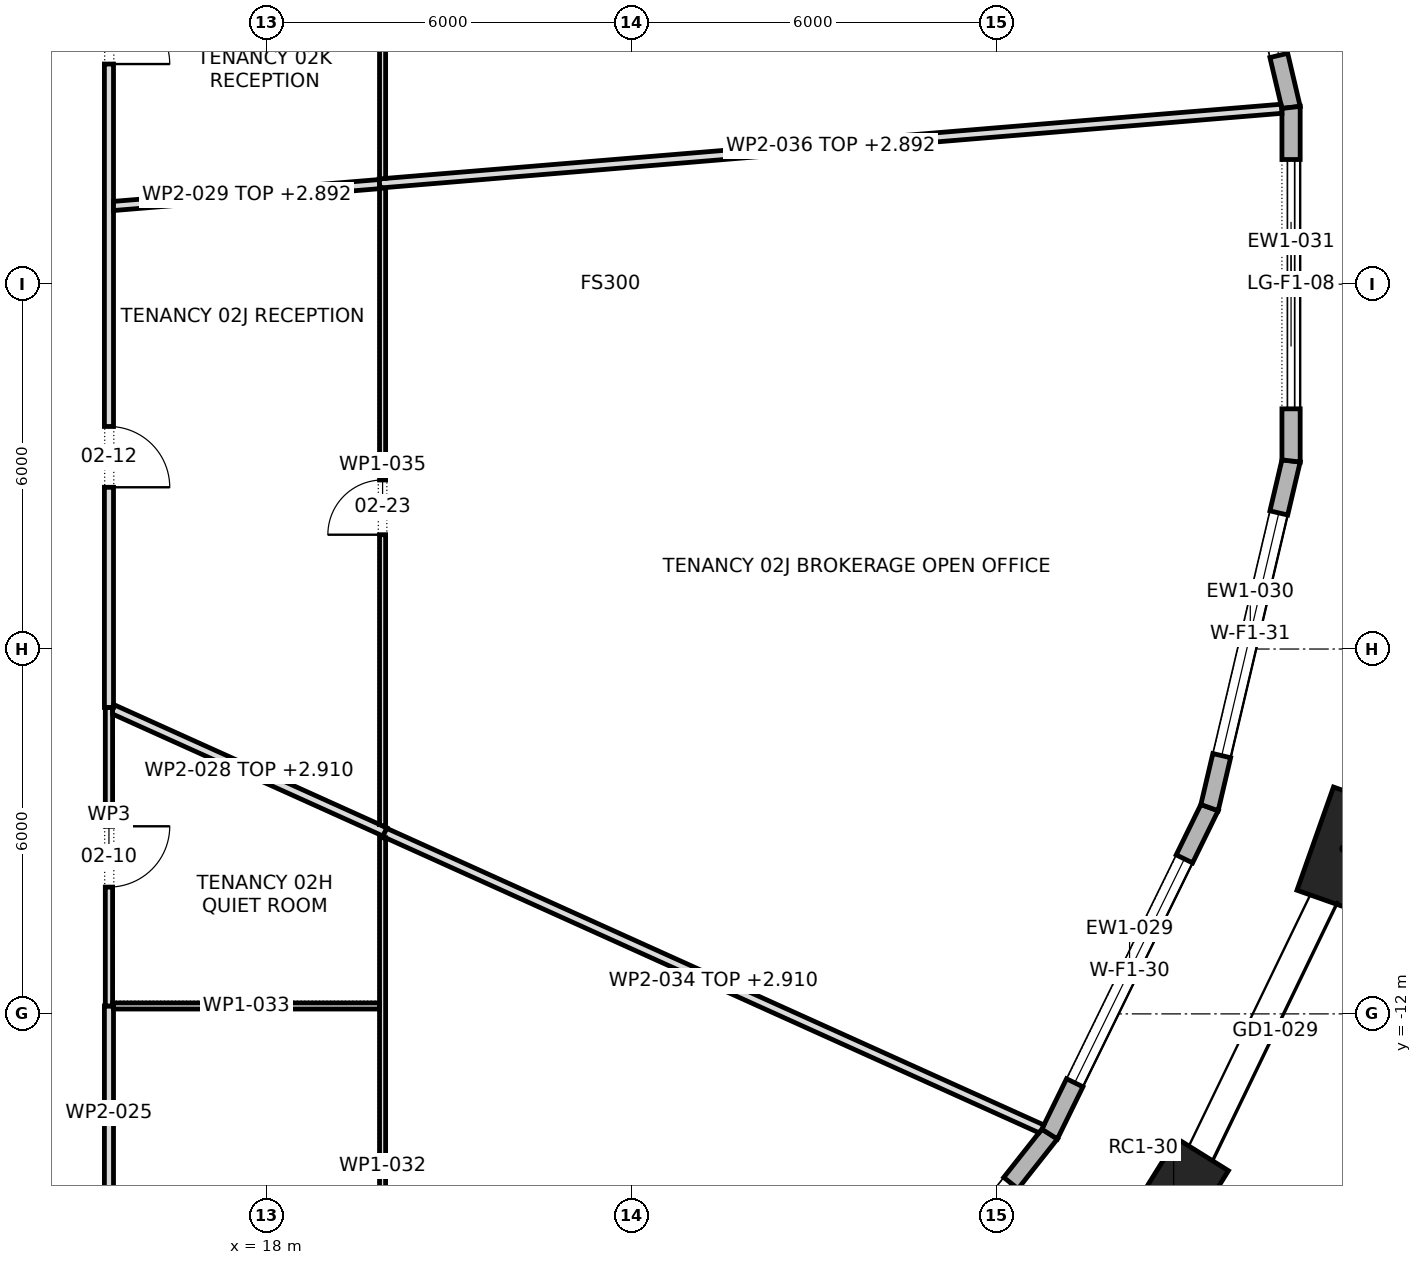
"""IFC4 building model, lengths in metres.
Left out: names, types, materials, properties, quantities, classifications, styles, units other than length and angle.
Written with IfcOpenShell. Run it as: python <this file> out.ifc"""

import sys

from ifc_helpers import new_model, si_unit, direction, frame, frame_2d, origin, origin_2d, place, context, subcontext, project, spatial, polyline, rectangle, outline, extrude, element, fill, save


model = new_model("IFC4")
c1 = context("Model", 3, precision=1e-05, world=origin(), true_north=direction((0.0, 1.0)))
c2 = subcontext(c1, "Body", "Model", "MODEL_VIEW")
j1 = project(units=[si_unit("LENGTHUNIT", "METRE"), si_unit("PLANEANGLEUNIT", "RADIAN")], contexts=[c1])
p1 = place(None, origin())
s1 = spatial("IfcSite", under=j1, at=p1, CompositionType="ELEMENT")
p2 = place(p1, origin())
s2 = spatial("IfcBuilding", under=s1, at=p2, CompositionType="ELEMENT")
p3 = place(p2, frame((0.0, 0.0, 44.5)))
s3 = spatial("IfcBuildingStorey", under=s2, at=p3, CompositionType="ELEMENT", Elevation=44.5)
for number, where, z_axis, x_axis in (
    (1, (32.91, -15.078, 0.0), (0.0, 0.0, 1.0), (0.529, 0.849, 0.0)),
    (2, (35.709, -9.285, 0.0), (0.0, 0.0, 1.0), (0.334, 0.943, 0.0)),
):
    element("IfcColumn", number, at=place(p3, frame(where, z_axis=z_axis, x_axis=x_axis)), inside=s3, PredefinedType="COLUMN", context=c2, shape_type="SweptSolid", body=[
        extrude(rectangle(XDim=1.8, YDim=1.0, at=origin_2d()), origin(), (0.0, 0.0, 1.0), 4.2),
    ])
p4 = place(p3, frame((34.84, 2.907, 0.0), z_axis=(0.0, 0.0, 1.0), x_axis=(-0.228976600496, 0.97343192696, 0.0)))
e3 = element("IfcWall", 3, at=p4, inside=s3, PredefinedType="STANDARD", context=c2, shape_type="SweptSolid", body=[
    extrude(outline(polyline([(-0.017, -0.15), (5.874, -0.15), (5.84, 0.15), (0.017, 0.15), (-0.017, -0.15)])), origin(), (0.0, 0.0, 1.0), 3.9),
])
p5 = place(p4, frame((0.878, 0.0, 0.6)))
e4 = element("IfcOpeningElement", 4, at=p5, cuts=e3, PredefinedType="OPENING", context=c2, shape_type="SweptSolid", body=[
    extrude(rectangle(XDim=4.1, YDim=2.85, at=frame_2d((2.05, 1.425))), frame((0.0, 0.162, 0.0), z_axis=(0.0, -1.0, 0.0), x_axis=(1.0, 0.0, 0.0)), (0.0, 0.0, 1.0), 0.324),
])
p6 = place(p3, frame((27.054, -18.806, 0.0), z_axis=(0.0, 0.0, 1.0), x_axis=(0.61992334328, 0.784662378642, 0.0)))
e5 = element("IfcWall", 5, at=p6, inside=s3, PredefinedType="STANDARD", context=c2, shape_type="SweptSolid", body=[
    extrude(outline(polyline([(-0.015, -0.15), (6.171, -0.15), (6.139, 0.15), (0.015, 0.15), (-0.015, -0.15)])), origin(), (0.0, 0.0, 1.0), 3.9),
])
p7 = place(p6, frame((1.027, 0.0, 0.6)))
e6 = element("IfcOpeningElement", 6, at=p7, cuts=e5, PredefinedType="OPENING", context=c2, shape_type="SweptSolid", body=[
    extrude(rectangle(XDim=4.1, YDim=2.85, at=frame_2d((2.05, 1.425))), frame((0.0, 0.162, 0.0), z_axis=(0.0, -1.0, 0.0), x_axis=(1.0, 0.0, 0.0)), (0.0, 0.0, 1.0), 0.324),
])
p8 = place(p3, frame((30.869, -13.976, 0.0), z_axis=(0.0, 0.0, 1.0), x_axis=(0.439896354052, 0.898048549741, 0.0)))
e7 = element("IfcWall", 7, at=p8, inside=s3, PredefinedType="STANDARD", context=c2, shape_type="SweptSolid", body=[
    extrude(outline(polyline([(-0.016, -0.15), (5.995, -0.15), (5.961, 0.15), (0.016, 0.15), (-0.016, -0.15)])), origin(), (0.0, 0.0, 1.0), 3.9),
])
p9 = place(p8, frame((0.939, 0.0, 0.6)))
e8 = element("IfcOpeningElement", 8, at=p9, cuts=e7, PredefinedType="OPENING", context=c2, shape_type="SweptSolid", body=[
    extrude(rectangle(XDim=4.1, YDim=2.85, at=frame_2d((2.05, 1.425))), frame((0.0, 0.162, 0.0), z_axis=(0.0, -1.0, 0.0), x_axis=(1.0, 0.0, 0.0)), (0.0, 0.0, 1.0), 0.324),
])
p10 = place(p3, frame((33.499, -8.608, 0.0), z_axis=(0.0, 0.0, 1.0), x_axis=(0.228976600496, 0.97343192696, 0.0)))
e9 = element("IfcWall", 9, at=p10, inside=s3, PredefinedType="STANDARD", context=c2, shape_type="SweptSolid", body=[
    extrude(outline(polyline([(-0.017, -0.15), (5.874, -0.15), (5.839, 0.15), (0.017, 0.15), (-0.017, -0.15)])), origin(), (0.0, 0.0, 1.0), 3.9),
])
p11 = place(p10, frame((0.878, 0.0, 0.6)))
e10 = element("IfcOpeningElement", 10, at=p11, cuts=e9, PredefinedType="OPENING", context=c2, shape_type="SweptSolid", body=[
    extrude(rectangle(XDim=4.1, YDim=2.85, at=frame_2d((2.05, 1.425))), frame((0.0, 0.162, 0.0), z_axis=(0.0, -1.0, 0.0), x_axis=(1.0, 0.0, 0.0)), (0.0, 0.0, 1.0), 0.324),
])
p12 = place(p3, frame((34.84, -2.907, 0.0), z_axis=(0.0, 0.0, 1.0), x_axis=(0.0, 1.0, 0.0)))
e11 = element("IfcWall", 11, at=p12, inside=s3, PredefinedType="STANDARD", context=c2, shape_type="SweptSolid", body=[
    extrude(outline(polyline([(-0.017, -0.15), (5.831, -0.15), (5.796, 0.15), (0.017, 0.15), (-0.017, -0.15)])), origin(), (0.0, 0.0, 1.0), 3.9),
])
p13 = place(p12, frame((0.857, 0.0, 0.0)))
e12 = element("IfcOpeningElement", 12, at=p13, cuts=e11, PredefinedType="OPENING", context=c2, shape_type="SweptSolid", body=[
    extrude(rectangle(XDim=4.1, YDim=3.45, at=frame_2d((2.05, 1.725))), frame((0.0, 0.162, 0.0), z_axis=(0.0, -1.0, 0.0), x_axis=(1.0, 0.0, 0.0)), (0.0, 0.0, 1.0), 0.324),
])
p14 = place(p3, frame((15.4, -11.87, 0.0), z_axis=(0.0, 0.0, 1.0), x_axis=(0.0, -1.0, 0.0)))
e13 = element("IfcWall", 13, at=p14, inside=s3, PredefinedType="PARTITIONING", context=c2, shape_type="SweptSolid", body=[
    extrude(outline(polyline([(0.0, -0.075), (1.728, -0.075), (3.455, -0.075), (3.605, 0.075), (1.802, 0.075), (0.0, 0.075), (0.0, -0.075)])), origin(), (0.0, 0.0, 1.0), 3.9),
])
p15 = place(p3, frame((15.4, -6.96, 0.0), z_axis=(0.0, 0.0, 1.0), x_axis=(0.0, -1.0, 0.0)))
e14 = element("IfcWall", 14, at=p15, inside=s3, PredefinedType="PARTITIONING", context=c2, shape_type="SweptSolid", body=[
    extrude(rectangle(XDim=4.91, YDim=0.12, at=frame_2d((2.455, 0.0))), origin(), (0.0, 0.0, 1.0), 3.9),
])
p16 = place(p15, frame((1.955, 0.0, 0.0)))
e15 = element("IfcOpeningElement", 15, at=p16, cuts=e14, PredefinedType="OPENING", context=c2, shape_type="SweptSolid", body=[
    extrude(rectangle(XDim=1.0, YDim=2.1, at=frame_2d((0.5, 1.05))), frame((0.0, 0.072, 0.0), z_axis=(0.0, -1.0, 0.0), x_axis=(1.0, 0.0, 0.0)), (0.0, 0.0, 1.0), 0.144),
])
p17 = place(p3, frame((15.4, -6.96, 0.0), z_axis=(0.0, 0.0, 1.0), x_axis=(0.0, 1.0, 0.0)))
e16 = element("IfcWall", 16, at=p17, inside=s3, PredefinedType="PARTITIONING", context=c2, shape_type="SweptSolid", body=[
    extrude(outline(polyline([(0.0, -0.075), (1.87, -0.075), (3.739, -0.075), (5.609, -0.075), (7.478, -0.075), (9.348, -0.075), (11.217, -0.075), (13.087, -0.075), (14.957, -0.075), (16.826, -0.075), (18.696, -0.075), (20.565, -0.075), (22.435, -0.075), (22.285, 0.075), (20.428, 0.075), (18.571, 0.075), (16.714, 0.075), (14.857, 0.075), (13.0, 0.075), (11.143, 0.075), (9.285, 0.075), (7.428, 0.075), (5.571, 0.075), (3.714, 0.075), (1.857, 0.075), (0.0, 0.075), (0.0, -0.075)])), origin(), (0.0, 0.0, 1.0), 3.9),
])
p18 = place(p17, frame((3.62, 0.0, 0.0)))
e17 = element("IfcOpeningElement", 17, at=p18, cuts=e16, PredefinedType="OPENING", context=c2, shape_type="SweptSolid", body=[
    extrude(rectangle(XDim=1.0, YDim=2.1, at=frame_2d((0.5, 1.05))), frame((0.0, 0.087, 0.0), z_axis=(0.0, -1.0, 0.0), x_axis=(1.0, 0.0, 0.0)), (0.0, 0.0, 1.0), 0.174),
])
p19 = place(p17, frame((10.58, 0.0, 0.0)))
e18 = element("IfcOpeningElement", 18, at=p19, cuts=e16, PredefinedType="OPENING", context=c2, shape_type="SweptSolid", body=[
    extrude(rectangle(XDim=1.0, YDim=2.1, at=frame_2d((0.5, 1.05))), frame((0.0, 0.087, 0.0), z_axis=(0.0, -1.0, 0.0), x_axis=(1.0, 0.0, 0.0)), (0.0, 0.0, 1.0), 0.174),
])
p20 = place(p17, frame((16.335, 0.0, 0.0)))
e19 = element("IfcOpeningElement", 19, at=p20, cuts=e16, PredefinedType="OPENING", context=c2, shape_type="SweptSolid", body=[
    extrude(rectangle(XDim=1.0, YDim=2.1, at=frame_2d((0.5, 1.05))), frame((0.0, 0.087, 0.0), z_axis=(0.0, -1.0, 0.0), x_axis=(1.0, 0.0, 0.0)), (0.0, 0.0, 1.0), 0.174),
])
p21 = place(p3, frame((15.444, -6.98, 0.0), z_axis=(0.0, 0.0, 1.0), x_axis=(0.911554382715, -0.411179531778, 0.0)))
e20 = element("IfcWall", 20, at=p21, inside=s3, PredefinedType="PARTITIONING", context=c2, shape_type="SweptSolid", body=[
    extrude(outline(polyline([(0.051, -0.075), (1.678, -0.075), (3.305, -0.075), (4.932, -0.075), (4.932, -0.054), (4.932, 0.075), (4.805, 0.075), (4.801, 0.073), (4.8, 0.075), (3.2, 0.075), (1.6, 0.075), (0.0, 0.075), (0.02, 0.031), (0.006, 0.025), (0.051, -0.075)])), origin(), (0.0, 0.0, 1.0), 2.91),
])
p22 = place(p3, frame((15.469, 1.286, 0.0), z_axis=(0.0, 0.0, 1.0), x_axis=(0.996634800256, 0.081969963512, 0.0)))
e21 = element("IfcWall", 21, at=p22, inside=s3, PredefinedType="PARTITIONING", context=c2, shape_type="SweptSolid", body=[
    extrude(outline(polyline([(0.0, -0.075), (1.463, -0.075), (2.926, -0.075), (4.389, -0.075), (4.389, -0.075), (4.393, -0.075), (4.396, -0.075), (4.396, 0.075), (2.935, 0.075), (1.473, 0.075), (0.012, 0.075), (0.0, -0.07), (0.0, -0.075)])), origin(), (0.0, 0.0, 1.0), 2.892),
])
p23 = place(p3, frame((19.9, -19.95, 0.0), z_axis=(0.0, 0.0, 1.0), x_axis=(0.0, 1.0, 0.0)))
e22 = element("IfcWall", 22, at=p23, inside=s3, PredefinedType="PARTITIONING", context=c2, shape_type="SweptSolid", body=[
    extrude(outline(polyline([(10.846, 0.05), (9.055, 0.05), (7.264, 0.05), (5.473, 0.05), (3.682, 0.05), (1.891, 0.05), (0.1, 0.05), (0.0, -0.05), (1.808, -0.05), (3.615, -0.05), (5.423, -0.05), (7.231, -0.05), (9.039, -0.05), (10.846, -0.05), (10.846, 0.05)])), origin(), (0.0, 0.0, 1.0), 3.9),
])
p24 = place(p23, frame((3.615, 0.0, 0.0)))
e23 = element("IfcOpeningElement", 23, at=p24, cuts=e22, PredefinedType="OPENING", context=c2, shape_type="SweptSolid", body=[
    extrude(rectangle(XDim=0.9, YDim=2.1, at=frame_2d((0.45, 1.05))), frame((0.0, 0.062, 0.0), z_axis=(0.0, -1.0, 0.0), x_axis=(1.0, 0.0, 0.0)), (0.0, 0.0, 1.0), 0.124),
])
p25 = place(p3, frame((19.85, -11.87, 0.0), z_axis=(0.0, 0.0, 1.0), x_axis=(-1.0, 0.0, 0.0)))
e24 = element("IfcWall", 24, at=p25, inside=s3, PredefinedType="PARTITIONING", context=c2, shape_type="SweptSolid", body=[
    extrude(outline(polyline([(4.39, -0.05), (4.39, 0.0), (4.375, 0.0), (4.375, 0.05), (2.917, 0.05), (1.458, 0.05), (0.0, 0.05), (0.0, -0.05), (1.463, -0.05), (2.927, -0.05), (4.39, -0.05)])), origin(), (0.0, 0.0, 1.0), 3.9),
])
p26 = place(p3, frame((19.937, -9.017, 0.0), z_axis=(0.0, 0.0, 1.0), x_axis=(0.911435859514, -0.411442187909, 0.0)))
e25 = element("IfcWall", 25, at=p26, inside=s3, PredefinedType="PARTITIONING", context=c2, shape_type="SweptSolid", body=[
    extrude(outline(polyline([(0.0, -0.075), (0.045, -0.075), (0.048, -0.074), (0.049, -0.075), (2.013, -0.075), (3.978, -0.075), (5.943, -0.075), (7.908, -0.075), (9.873, -0.075), (11.838, -0.075), (11.856, -0.001), (11.858, 0.069), (11.858, 0.075), (9.882, 0.075), (7.906, 0.075), (5.929, 0.075), (3.953, 0.075), (1.976, 0.075), (0.0, 0.075), (0.0, -0.075)])), origin(), (0.0, 0.0, 1.0), 2.91),
])
p27 = place(p3, frame((19.9, 1.588, 0.0), z_axis=(0.0, 0.0, 1.0), x_axis=(0.0, -1.0, 0.0)))
e26 = element("IfcWall", 26, at=p27, inside=s3, PredefinedType="PARTITIONING", context=c2, shape_type="SweptSolid", body=[
    extrude(outline(polyline([(0.018, -0.05), (1.76, -0.05), (3.503, -0.05), (5.246, -0.05), (6.988, -0.05), (8.731, -0.05), (10.473, -0.05), (10.518, 0.049), (10.518, 0.05), (8.765, 0.05), (7.012, 0.05), (5.259, 0.05), (3.506, 0.05), (1.753, 0.05), (0.0, 0.05), (0.0, 0.044), (0.007, -0.043), (0.0, -0.044), (0.0, -0.044), (0.017, -0.043), (0.018, -0.05)])), origin(), (0.0, 0.0, 1.0), 3.9),
])
p28 = place(p27, frame((4.809, 0.0, 0.0)))
e27 = element("IfcOpeningElement", 27, at=p28, cuts=e26, PredefinedType="OPENING", context=c2, shape_type="SweptSolid", body=[
    extrude(rectangle(XDim=0.9, YDim=2.1, at=frame_2d((0.45, 1.05))), frame((0.0, 0.062, 0.0), z_axis=(0.0, -1.0, 0.0), x_axis=(1.0, 0.0, 0.0)), (0.0, 0.0, 1.0), 0.124),
])
p29 = place(p3, frame((19.85, 1.656, 0.0), z_axis=(0.0, 0.0, 1.0), x_axis=(0.996587936268, 0.082537780956, 0.0)))
e28 = element("IfcWall", 28, at=p29, inside=s3, PredefinedType="PARTITIONING", context=c2, shape_type="SweptSolid", body=[
    extrude(outline(polyline([(14.884, -0.075), (14.884, 0.05), (14.881, 0.075), (13.021, 0.075), (11.16, 0.075), (9.3, 0.075), (7.44, 0.075), (5.58, 0.075), (3.72, 0.075), (1.86, 0.075), (0.0, 0.075), (0.0, -0.068), (0.087, -0.075), (1.937, -0.075), (3.786, -0.075), (5.636, -0.075), (7.486, -0.075), (9.335, -0.075), (11.185, -0.075), (13.035, -0.075), (14.884, -0.075)])), origin(), (0.0, 0.0, 1.0), 2.892),
])
p30 = place(p3, frame((19.9, 8.94, 0.0), z_axis=(0.0, 0.0, 1.0), x_axis=(0.0, -1.0, 0.0)))
e29 = element("IfcWall", 29, at=p30, inside=s3, PredefinedType="PARTITIONING", context=c2, shape_type="SweptSolid", body=[
    extrude(outline(polyline([(7.208, -0.05), (7.208, -0.046), (7.201, 0.05), (5.4, 0.05), (3.6, 0.05), (1.8, 0.05), (0.0, 0.05), (0.0, 0.049), (0.029, -0.015), (0.0, -0.028), (0.0, -0.028), (0.037, -0.011), (0.055, -0.05), (1.843, -0.05), (3.632, -0.05), (5.42, -0.05), (7.208, -0.05)])), origin(), (0.0, 0.0, 1.0), 3.9),
])
p31 = place(p30, frame((3.165, 0.0, 0.0)))
e30 = element("IfcOpeningElement", 30, at=p31, cuts=e29, PredefinedType="OPENING", context=c2, shape_type="SweptSolid", body=[
    extrude(rectangle(XDim=0.9, YDim=2.1, at=frame_2d((0.45, 1.05))), frame((0.0, 0.062, 0.0), z_axis=(0.0, -1.0, 0.0), x_axis=(1.0, 0.0, 0.0)), (0.0, 0.0, 1.0), 0.124),
])
p32 = place(p5, origin())
e31 = element("IfcWindow", 31, at=p32, inside=s3, PartitioningType="TRIPLE_PANEL_VERTICAL", PredefinedType="WINDOW", context=c2, shape_type="SweptSolid", body=[
    extrude(rectangle(XDim=4.1, YDim=2.85, at=frame_2d((2.05, 1.425))), frame((0.0, 0.03, 0.0), z_axis=(0.0, -1.0, 0.0), x_axis=(1.0, 0.0, 0.0)), (0.0, 0.0, 1.0), 0.06),
])
fill(e4, e31)
p33 = place(p7, origin())
e32 = element("IfcWindow", 32, at=p33, inside=s3, PartitioningType="TRIPLE_PANEL_VERTICAL", PredefinedType="WINDOW", context=c2, shape_type="SweptSolid", body=[
    extrude(rectangle(XDim=4.1, YDim=2.85, at=frame_2d((2.05, 1.425))), frame((0.0, 0.03, 0.0), z_axis=(0.0, -1.0, 0.0), x_axis=(1.0, 0.0, 0.0)), (0.0, 0.0, 1.0), 0.06),
])
fill(e6, e32)
p34 = place(p9, origin())
e33 = element("IfcWindow", 33, at=p34, inside=s3, PartitioningType="TRIPLE_PANEL_VERTICAL", PredefinedType="WINDOW", context=c2, shape_type="SweptSolid", body=[
    extrude(rectangle(XDim=4.1, YDim=2.85, at=frame_2d((2.05, 1.425))), frame((0.0, 0.03, 0.0), z_axis=(0.0, -1.0, 0.0), x_axis=(1.0, 0.0, 0.0)), (0.0, 0.0, 1.0), 0.06),
])
fill(e8, e33)
p35 = place(p11, origin())
e34 = element("IfcWindow", 34, at=p35, inside=s3, PartitioningType="TRIPLE_PANEL_VERTICAL", PredefinedType="WINDOW", context=c2, shape_type="SweptSolid", body=[
    extrude(rectangle(XDim=4.1, YDim=2.85, at=frame_2d((2.05, 1.425))), frame((0.0, 0.03, 0.0), z_axis=(0.0, -1.0, 0.0), x_axis=(1.0, 0.0, 0.0)), (0.0, 0.0, 1.0), 0.06),
])
fill(e10, e34)
p36 = place(p13, origin())
e35 = element("IfcDoor", 35, at=p36, inside=s3, OperationType="DOUBLE_DOOR_SLIDING", PredefinedType="DOOR", context=c2, shape_type="SweptSolid", body=[
    extrude(rectangle(XDim=4.1, YDim=3.45, at=frame_2d((2.05, 1.725))), frame((0.0, 0.025, 0.0), z_axis=(0.0, -1.0, 0.0), x_axis=(1.0, 0.0, 0.0)), (0.0, 0.0, 1.0), 0.05),
])
fill(e12, e35)
p37 = place(p16, origin())
e36 = element("IfcDoor", 36, at=p37, inside=s3, OperationType="SINGLE_SWING_RIGHT", PredefinedType="DOOR", context=c2, shape_type="SweptSolid", body=[
    extrude(rectangle(XDim=1.0, YDim=2.1, at=frame_2d((0.5, 1.05))), frame((0.0, 0.025, 0.0), z_axis=(0.0, -1.0, 0.0), x_axis=(1.0, 0.0, 0.0)), (0.0, 0.0, 1.0), 0.05),
])
fill(e15, e36)
p38 = place(p18, frame((1.0, 0.0, 0.0), z_axis=(0.0, 0.0, 1.0), x_axis=(-1.0, 0.0, 0.0)))
e37 = element("IfcDoor", 37, at=p38, inside=s3, OperationType="SINGLE_SWING_LEFT", PredefinedType="DOOR", context=c2, shape_type="SweptSolid", body=[
    extrude(rectangle(XDim=1.0, YDim=2.1, at=frame_2d((0.5, 1.05))), frame((0.0, 0.025, 0.0), z_axis=(0.0, -1.0, 0.0), x_axis=(1.0, 0.0, 0.0)), (0.0, 0.0, 1.0), 0.05),
])
fill(e17, e37)
p39 = place(p19, frame((1.0, 0.0, 0.0), z_axis=(0.0, 0.0, 1.0), x_axis=(-1.0, 0.0, 0.0)))
e38 = element("IfcDoor", 38, at=p39, inside=s3, OperationType="SINGLE_SWING_LEFT", PredefinedType="DOOR", context=c2, shape_type="SweptSolid", body=[
    extrude(rectangle(XDim=1.0, YDim=2.1, at=frame_2d((0.5, 1.05))), frame((0.0, 0.025, 0.0), z_axis=(0.0, -1.0, 0.0), x_axis=(1.0, 0.0, 0.0)), (0.0, 0.0, 1.0), 0.05),
])
fill(e18, e38)
p40 = place(p28, frame((0.9, 0.0, 0.0), z_axis=(0.0, 0.0, 1.0), x_axis=(-1.0, 0.0, 0.0)))
e39 = element("IfcDoor", 39, at=p40, inside=s3, OperationType="SINGLE_SWING_RIGHT", PredefinedType="DOOR", context=c2, shape_type="SweptSolid", body=[
    extrude(rectangle(XDim=0.9, YDim=2.1, at=frame_2d((0.45, 1.05))), frame((0.0, 0.025, 0.0), z_axis=(0.0, -1.0, 0.0), x_axis=(1.0, 0.0, 0.0)), (0.0, 0.0, 1.0), 0.05),
])
fill(e27, e39)
save(model, sys.argv[1])
